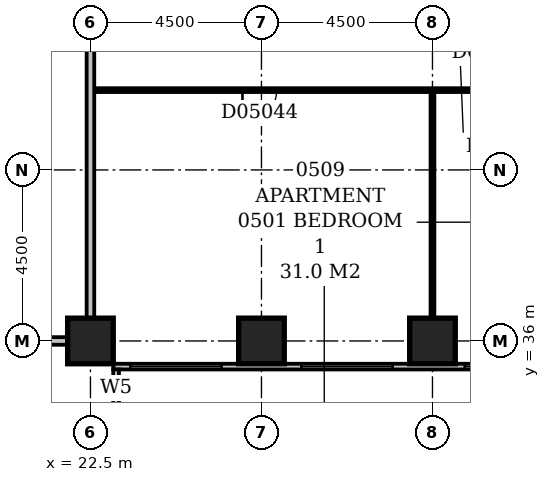
"""IFC4 building model, lengths in metres.
Left out: names, types, materials, properties, quantities, classifications, styles, units other than length and angle.
Written with IfcOpenShell. Run it as: python <this file> out.ifc"""

import sys

from ifc_helpers import new_model, si_unit, direction, frame, frame_2d, origin, origin_2d, place, context, subcontext, project, spatial, rectangle, extrude, element, fill, save


model = new_model("IFC4")
c1 = context("Model", 3, precision=1e-05, world=origin(), true_north=direction((0.0, 1.0)))
c2 = subcontext(c1, "Body", "Model", "MODEL_VIEW")
j1 = project(units=[si_unit("LENGTHUNIT", "METRE"), si_unit("PLANEANGLEUNIT", "RADIAN")], contexts=[c1])
p1 = place(None, origin())
s1 = spatial("IfcSite", under=j1, at=p1, CompositionType="ELEMENT")
p2 = place(p1, origin())
s2 = spatial("IfcBuilding", under=s1, at=p2, CompositionType="ELEMENT")
p3 = place(p2, frame((0.0, 0.0, 29.0)))
s3 = spatial("IfcBuildingStorey", under=s2, at=p3, CompositionType="ELEMENT", Elevation=29.0)
for number, where, z_axis, x_axis in (
    (1, (22.5, 36.0, -0.3), (0.0, 0.0, 1.0), (1.0, 0.0, 0.0)),
    (2, (27.0, 36.0, -0.3), (0.0, 0.0, 1.0), (1.0, 0.0, 0.0)),
    (3, (31.5, 36.0, -0.3), (0.0, 0.0, 1.0), (1.0, 0.0, 0.0)),
):
    element("IfcColumn", number, at=place(p3, frame(where, z_axis=z_axis, x_axis=x_axis)), inside=s3, PredefinedType="COLUMN", context=c2, shape_type="SweptSolid", body=[
        extrude(rectangle(XDim=1.2, YDim=1.2, at=origin_2d()), origin(), (0.0, 0.0, 1.0), 3.6),
    ])
p4 = place(p3, frame((23.175, 17.4, 0.0), z_axis=(0.0, 0.0, 1.0), x_axis=(0.0, 1.0, 0.0)))
e4 = element("IfcWall", 4, at=p4, inside=s3, PredefinedType="STANDARD", context=c2, shape_type="SweptSolid", body=[
    extrude(rectangle(XDim=17.85, YDim=0.15, at=frame_2d((8.925, 0.0))), origin(), (0.0, 0.0, 1.0), 2.7),
])
p5 = place(p4, frame((1.65, 0.0, 0.6)))
e5 = element("IfcOpeningElement", 5, at=p5, cuts=e4, PredefinedType="OPENING", context=c2, shape_type="SweptSolid", body=[
    extrude(rectangle(XDim=2.4, YDim=1.8, at=frame_2d((1.2, 0.9))), frame((0.0, 0.087, 0.0), z_axis=(0.0, -1.0, 0.0), x_axis=(1.0, 0.0, 0.0)), (0.0, 0.0, 1.0), 0.174),
])
p6 = place(p4, frame((6.15, 0.0, 0.6)))
e6 = element("IfcOpeningElement", 6, at=p6, cuts=e4, PredefinedType="OPENING", context=c2, shape_type="SweptSolid", body=[
    extrude(rectangle(XDim=2.4, YDim=1.8, at=frame_2d((1.2, 0.9))), frame((0.0, 0.087, 0.0), z_axis=(0.0, -1.0, 0.0), x_axis=(1.0, 0.0, 0.0)), (0.0, 0.0, 1.0), 0.174),
])
p7 = place(p4, frame((10.65, 0.0, 0.6)))
e7 = element("IfcOpeningElement", 7, at=p7, cuts=e4, PredefinedType="OPENING", context=c2, shape_type="SweptSolid", body=[
    extrude(rectangle(XDim=2.4, YDim=1.8, at=frame_2d((1.2, 0.9))), frame((0.0, 0.087, 0.0), z_axis=(0.0, -1.0, 0.0), x_axis=(1.0, 0.0, 0.0)), (0.0, 0.0, 1.0), 0.174),
])
p8 = place(p4, frame((17.138, 0.0, 0.6)))
e8 = element("IfcOpeningElement", 8, at=p8, cuts=e4, PredefinedType="OPENING", context=c2, shape_type="SweptSolid", body=[
    extrude(rectangle(XDim=0.45, YDim=1.8, at=frame_2d((0.225, 0.9))), frame((0.0, 0.087, 0.0), z_axis=(0.0, -1.0, 0.0), x_axis=(1.0, 0.0, 0.0)), (0.0, 0.0, 1.0), 0.174),
])
p9 = place(p3, frame((23.1, 35.325, 0.0), z_axis=(0.0, 0.0, 1.0), x_axis=(1.0, 0.0, 0.0)))
e9 = element("IfcWall", 9, at=p9, inside=s3, PredefinedType="STANDARD", context=c2, shape_type="SweptSolid", body=[
    extrude(rectangle(XDim=45.15, YDim=0.15, at=frame_2d((22.575, 0.0))), origin(), (0.0, 0.0, 1.0), 2.7),
])
p10 = place(p9, frame((0.45, 0.0, 0.6)))
e10 = element("IfcOpeningElement", 10, at=p10, cuts=e9, PredefinedType="OPENING", context=c2, shape_type="SweptSolid", body=[
    extrude(rectangle(XDim=2.4, YDim=1.8, at=frame_2d((1.2, 0.9))), frame((0.0, 0.087, 0.0), z_axis=(0.0, -1.0, 0.0), x_axis=(1.0, 0.0, 0.0)), (0.0, 0.0, 1.0), 0.174),
])
p11 = place(p9, frame((4.95, 0.0, 0.6)))
e11 = element("IfcOpeningElement", 11, at=p11, cuts=e9, PredefinedType="OPENING", context=c2, shape_type="SweptSolid", body=[
    extrude(rectangle(XDim=2.4, YDim=1.8, at=frame_2d((1.2, 0.9))), frame((0.0, 0.087, 0.0), z_axis=(0.0, -1.0, 0.0), x_axis=(1.0, 0.0, 0.0)), (0.0, 0.0, 1.0), 0.174),
])
p12 = place(p9, frame((9.25, 0.0, 0.6)))
e12 = element("IfcOpeningElement", 12, at=p12, cuts=e9, PredefinedType="OPENING", context=c2, shape_type="SweptSolid", body=[
    extrude(rectangle(XDim=1.5, YDim=1.8, at=frame_2d((0.75, 0.9))), frame((0.0, 0.087, 0.0), z_axis=(0.0, -1.0, 0.0), x_axis=(1.0, 0.0, 0.0)), (0.0, 0.0, 1.0), 0.174),
])
p13 = place(p9, frame((15.277, 0.0, 0.6)))
e13 = element("IfcOpeningElement", 13, at=p13, cuts=e9, PredefinedType="OPENING", context=c2, shape_type="SweptSolid", body=[
    extrude(rectangle(XDim=1.2, YDim=1.8, at=frame_2d((0.6, 0.9))), frame((0.0, 0.087, 0.0), z_axis=(0.0, -1.0, 0.0), x_axis=(1.0, 0.0, 0.0)), (0.0, 0.0, 1.0), 0.174),
])
p14 = place(p9, frame((18.45, 0.0, 0.6)))
e14 = element("IfcOpeningElement", 14, at=p14, cuts=e9, PredefinedType="OPENING", context=c2, shape_type="SweptSolid", body=[
    extrude(rectangle(XDim=2.4, YDim=1.8, at=frame_2d((1.2, 0.9))), frame((0.0, 0.087, 0.0), z_axis=(0.0, -1.0, 0.0), x_axis=(1.0, 0.0, 0.0)), (0.0, 0.0, 1.0), 0.174),
])
p15 = place(p9, frame((22.95, 0.0, 0.6)))
e15 = element("IfcOpeningElement", 15, at=p15, cuts=e9, PredefinedType="OPENING", context=c2, shape_type="SweptSolid", body=[
    extrude(rectangle(XDim=2.4, YDim=1.8, at=frame_2d((1.2, 0.9))), frame((0.0, 0.087, 0.0), z_axis=(0.0, -1.0, 0.0), x_axis=(1.0, 0.0, 0.0)), (0.0, 0.0, 1.0), 0.174),
])
p16 = place(p9, frame((27.45, 0.0, 0.6)))
e16 = element("IfcOpeningElement", 16, at=p16, cuts=e9, PredefinedType="OPENING", context=c2, shape_type="SweptSolid", body=[
    extrude(rectangle(XDim=2.4, YDim=1.8, at=frame_2d((1.2, 0.9))), frame((0.0, 0.087, 0.0), z_axis=(0.0, -1.0, 0.0), x_axis=(1.0, 0.0, 0.0)), (0.0, 0.0, 1.0), 0.174),
])
p17 = place(p9, frame((31.95, 0.0, 0.6)))
e17 = element("IfcOpeningElement", 17, at=p17, cuts=e9, PredefinedType="OPENING", context=c2, shape_type="SweptSolid", body=[
    extrude(rectangle(XDim=2.4, YDim=1.8, at=frame_2d((1.2, 0.9))), frame((0.0, 0.087, 0.0), z_axis=(0.0, -1.0, 0.0), x_axis=(1.0, 0.0, 0.0)), (0.0, 0.0, 1.0), 0.174),
])
p18 = place(p9, frame((36.45, 0.0, 0.6)))
e18 = element("IfcOpeningElement", 18, at=p18, cuts=e9, PredefinedType="OPENING", context=c2, shape_type="SweptSolid", body=[
    extrude(rectangle(XDim=2.4, YDim=1.8, at=frame_2d((1.2, 0.9))), frame((0.0, 0.087, 0.0), z_axis=(0.0, -1.0, 0.0), x_axis=(1.0, 0.0, 0.0)), (0.0, 0.0, 1.0), 0.174),
])
p19 = place(p9, frame((40.797, 0.0, 0.6)))
e19 = element("IfcOpeningElement", 19, at=p19, cuts=e9, PredefinedType="OPENING", context=c2, shape_type="SweptSolid", body=[
    extrude(rectangle(XDim=0.6, YDim=1.8, at=frame_2d((0.3, 0.9))), frame((0.0, 0.087, 0.0), z_axis=(0.0, -1.0, 0.0), x_axis=(1.0, 0.0, 0.0)), (0.0, 0.0, 1.0), 0.174),
])
p20 = place(p3, frame((9.1, 36.0, 0.0), z_axis=(0.0, 0.0, 1.0), x_axis=(1.0, 0.0, 0.0)))
e20 = element("IfcWall", 20, at=p20, inside=s3, PredefinedType="PARTITIONING", context=c2, shape_type="SweptSolid", body=[
    extrude(rectangle(XDim=12.8, YDim=0.2, at=frame_2d((6.4, 0.0))), origin(), (0.0, 0.0, 1.0), 2.4),
])
p21 = place(p3, frame((22.5, 36.6, 0.0), z_axis=(0.0, 0.0, 1.0), x_axis=(0.0, 1.0, 0.0)))
e21 = element("IfcWall", 21, at=p21, inside=s3, PredefinedType="PARTITIONING", context=c2, shape_type="SweptSolid", body=[
    extrude(rectangle(XDim=12.8, YDim=0.2, at=frame_2d((6.4, 0.0))), origin(), (0.0, 0.0, 1.0), 3.3),
])
p22 = place(p3, frame((31.5, 36.6, 0.0), z_axis=(0.0, 0.0, 1.0), x_axis=(0.0, 1.0, 0.0)))
e22 = element("IfcWall", 22, at=p22, inside=s3, PredefinedType="PARTITIONING", context=c2, shape_type="SweptSolid", body=[
    extrude(rectangle(XDim=5.95, YDim=0.1, at=frame_2d((2.975, 0.0))), origin(), (0.0, 0.0, 1.0), 3.3),
])
p23 = place(p3, frame((22.6, 42.6, 0.0), z_axis=(0.0, 0.0, 1.0), x_axis=(1.0, 0.0, 0.0)))
e23 = element("IfcWall", 23, at=p23, inside=s3, PredefinedType="PARTITIONING", context=c2, shape_type="SweptSolid", body=[
    extrude(rectangle(XDim=17.8, YDim=0.1, at=frame_2d((8.9, 0.0))), origin(), (0.0, 0.0, 1.0), 3.3),
])
p24 = place(p23, frame((3.9, 0.0, 0.0)))
e24 = element("IfcOpeningElement", 24, at=p24, cuts=e23, PredefinedType="OPENING", context=c2, shape_type="SweptSolid", body=[
    extrude(rectangle(XDim=0.9, YDim=2.1, at=frame_2d((0.45, 1.05))), frame((0.0, 0.062, 0.0), z_axis=(0.0, -1.0, 0.0), x_axis=(1.0, 0.0, 0.0)), (0.0, 0.0, 1.0), 0.124),
])
p25 = place(p23, frame((10.7, 0.0, 0.0)))
e25 = element("IfcOpeningElement", 25, at=p25, cuts=e23, PredefinedType="OPENING", context=c2, shape_type="SweptSolid", body=[
    extrude(rectangle(XDim=0.9, YDim=2.1, at=frame_2d((0.45, 1.05))), frame((0.0, 0.062, 0.0), z_axis=(0.0, -1.0, 0.0), x_axis=(1.0, 0.0, 0.0)), (0.0, 0.0, 1.0), 0.124),
])
p26 = place(p23, frame((14.05, 0.0, 0.0)))
e26 = element("IfcOpeningElement", 26, at=p26, cuts=e23, PredefinedType="OPENING", context=c2, shape_type="SweptSolid", body=[
    extrude(rectangle(XDim=0.9, YDim=2.1, at=frame_2d((0.45, 1.05))), frame((0.0, 0.062, 0.0), z_axis=(0.0, -1.0, 0.0), x_axis=(1.0, 0.0, 0.0)), (0.0, 0.0, 1.0), 0.124),
])
p27 = place(p8, origin())
e27 = element("IfcWindow", 27, at=p27, inside=s3, PartitioningType="SINGLE_PANEL", PredefinedType="WINDOW", context=c2, shape_type="SweptSolid", body=[
    extrude(rectangle(XDim=0.45, YDim=1.8, at=frame_2d((0.225, 0.9))), frame((0.0, 0.03, 0.0), z_axis=(0.0, -1.0, 0.0), x_axis=(1.0, 0.0, 0.0)), (0.0, 0.0, 1.0), 0.06),
])
fill(e8, e27)
p28 = place(p10, origin())
e28 = element("IfcWindow", 28, at=p28, inside=s3, PartitioningType="SINGLE_PANEL", PredefinedType="WINDOW", context=c2, shape_type="SweptSolid", body=[
    extrude(rectangle(XDim=2.4, YDim=1.8, at=frame_2d((1.2, 0.9))), frame((0.0, 0.03, 0.0), z_axis=(0.0, -1.0, 0.0), x_axis=(1.0, 0.0, 0.0)), (0.0, 0.0, 1.0), 0.06),
])
fill(e10, e28)
p29 = place(p11, origin())
e29 = element("IfcWindow", 29, at=p29, inside=s3, PartitioningType="SINGLE_PANEL", PredefinedType="WINDOW", context=c2, shape_type="SweptSolid", body=[
    extrude(rectangle(XDim=2.4, YDim=1.8, at=frame_2d((1.2, 0.9))), frame((0.0, 0.03, 0.0), z_axis=(0.0, -1.0, 0.0), x_axis=(1.0, 0.0, 0.0)), (0.0, 0.0, 1.0), 0.06),
])
fill(e11, e29)
p30 = place(p12, origin())
e30 = element("IfcWindow", 30, at=p30, inside=s3, PartitioningType="SINGLE_PANEL", PredefinedType="WINDOW", context=c2, shape_type="SweptSolid", body=[
    extrude(rectangle(XDim=1.5, YDim=1.8, at=frame_2d((0.75, 0.9))), frame((0.0, 0.03, 0.0), z_axis=(0.0, -1.0, 0.0), x_axis=(1.0, 0.0, 0.0)), (0.0, 0.0, 1.0), 0.06),
])
fill(e12, e30)
p31 = place(p24, frame((0.9, 0.0, 0.0), z_axis=(0.0, 0.0, 1.0), x_axis=(-1.0, 0.0, 0.0)))
e31 = element("IfcDoor", 31, at=p31, inside=s3, OperationType="SINGLE_SWING_RIGHT", PredefinedType="DOOR", context=c2, shape_type="SweptSolid", body=[
    extrude(rectangle(XDim=0.9, YDim=2.1, at=frame_2d((0.45, 1.05))), frame((0.0, 0.025, 0.0), z_axis=(0.0, -1.0, 0.0), x_axis=(1.0, 0.0, 0.0)), (0.0, 0.0, 1.0), 0.05),
])
fill(e24, e31)
save(model, sys.argv[1])
